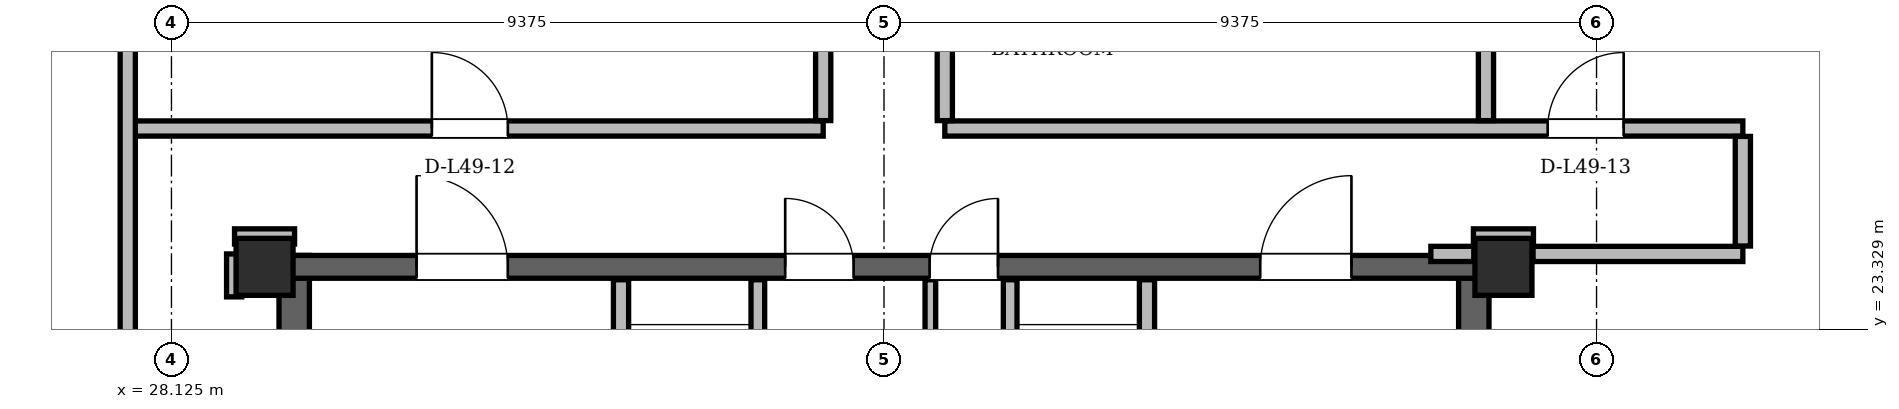
"""IFC4 building model, lengths in metres.
Left out: names, types, materials, properties, quantities, classifications, styles, units other than length and angle.
Written with IfcOpenShell. Run it as: python <this file> out.ifc"""

import sys

from ifc_helpers import new_model, si_unit, direction, frame, frame_2d, origin, origin_2d, place, context, subcontext, project, spatial, rectangle, hollow_rectangle, extrude, element, fill, save


model = new_model("IFC4")
c1 = context("Model", 3, precision=1e-05, world=origin(), true_north=direction((0.0, 1.0)))
c2 = subcontext(c1, "Body", "Model", "MODEL_VIEW")
j1 = project(units=[si_unit("LENGTHUNIT", "METRE"), si_unit("PLANEANGLEUNIT", "RADIAN")], contexts=[c1])
p1 = place(None, origin())
s1 = spatial("IfcSite", under=j1, at=p1, CompositionType="ELEMENT")
p2 = place(p1, origin())
s2 = spatial("IfcBuilding", under=s1, at=p2, CompositionType="ELEMENT")
p3 = place(p2, frame((0.0, 0.0, 185.4)))
s3 = spatial("IfcBuildingStorey", under=s2, at=p3, CompositionType="ELEMENT", Elevation=185.4)
for number, where, z_axis, x_axis in (
    (1, (45.65, 24.15, 0.0), (0.0, 0.0, 1.0), (1.0, 0.0, 0.0)),
    (2, (29.35, 24.15, 0.0), (0.0, 0.0, 1.0), (1.0, 0.0, 0.0)),
):
    element("IfcColumn", number, at=place(p3, frame(where, z_axis=z_axis, x_axis=x_axis)), inside=s3, PredefinedType="COLUMN", context=c2, shape_type="SweptSolid", body=[
        extrude(hollow_rectangle(XDim=0.75, YDim=0.75, WallThickness=0.06, at=origin_2d()), origin(), (0.0, 0.0, 1.0), 3.6),
    ])
for number, where, z_axis, x_axis in (
    (3, (29.74, 11.0, 0.0), (0.0, 0.0, 1.0), (0.0, 1.0, 0.0)),
    (4, (45.26, 11.0, 0.0), (0.0, 0.0, 1.0), (0.0, 1.0, 0.0)),
):
    element("IfcWall", number, at=place(p3, frame(where, z_axis=z_axis, x_axis=x_axis)), inside=s3, PredefinedType="SHEAR", context=c2, shape_type="SweptSolid", body=[
        extrude(rectangle(XDim=13.3, YDim=0.4, at=frame_2d((6.65, 0.0))), origin(), (0.0, 0.0, 1.0), 3.34),
    ])
p4 = place(p3, frame((29.65, 24.15, 0.0), z_axis=(0.0, 0.0, 1.0), x_axis=(1.0, 0.0, 0.0)))
e5 = element("IfcWall", 5, at=p4, inside=s3, PredefinedType="SHEAR", context=c2, shape_type="SweptSolid", body=[
    extrude(rectangle(XDim=15.7, YDim=0.3, at=frame_2d((7.85, 0.0))), origin(), (0.0, 0.0, 1.0), 3.34),
])
p5 = place(p4, frame((1.7, 0.0, 0.0)))
e6 = element("IfcOpeningElement", 6, at=p5, cuts=e5, PredefinedType="OPENING", context=c2, shape_type="SweptSolid", body=[
    extrude(rectangle(XDim=1.2, YDim=2.2, at=frame_2d((0.6, 1.1))), frame((0.0, 0.15, 0.0), z_axis=(0.0, -1.0, 0.0), x_axis=(1.0, 0.0, 0.0)), (0.0, 0.0, 1.0), 0.3),
])
p6 = place(p4, frame((12.8, 0.0, 0.0)))
e7 = element("IfcOpeningElement", 7, at=p6, cuts=e5, PredefinedType="OPENING", context=c2, shape_type="SweptSolid", body=[
    extrude(rectangle(XDim=1.2, YDim=2.2, at=frame_2d((0.6, 1.1))), frame((0.0, 0.15, 0.0), z_axis=(0.0, -1.0, 0.0), x_axis=(1.0, 0.0, 0.0)), (0.0, 0.0, 1.0), 0.3),
])
p7 = place(p4, frame((6.55, 0.0, 0.0)))
e8 = element("IfcOpeningElement", 8, at=p7, cuts=e5, PredefinedType="OPENING", context=c2, shape_type="SweptSolid", body=[
    extrude(rectangle(XDim=0.9, YDim=2.05, at=frame_2d((0.45, 1.025))), frame((0.0, 0.15, 0.0), z_axis=(0.0, -1.0, 0.0), x_axis=(1.0, 0.0, 0.0)), (0.0, 0.0, 1.0), 0.3),
])
p8 = place(p4, frame((8.45, 0.0, 0.0)))
e9 = element("IfcOpeningElement", 9, at=p8, cuts=e5, PredefinedType="OPENING", context=c2, shape_type="SweptSolid", body=[
    extrude(rectangle(XDim=0.9, YDim=2.05, at=frame_2d((0.45, 1.025))), frame((0.0, 0.15, 0.0), z_axis=(0.0, -1.0, 0.0), x_axis=(1.0, 0.0, 0.0)), (0.0, 0.0, 1.0), 0.3),
])
p9 = place(p3, frame((59.519, 11.962, 0.0), z_axis=(0.0, 0.0, 1.0), x_axis=(-0.500007042689, 0.866021337648, 0.0)))
e10 = element("IfcWall", 10, at=p9, inside=s3, PredefinedType="SOLIDWALL", context=c2, shape_type="SweptSolid", body=[
    extrude(rectangle(XDim=36.115, YDim=0.29, at=frame_2d((18.057, 0.0))), origin(), (0.0, 0.0, 1.0), 2.56),
])
p10 = place(p9, frame((8.034, 0.0, 0.0)))
e11 = element("IfcOpeningElement", 11, at=p10, cuts=e10, PredefinedType="OPENING", context=c2, shape_type="SweptSolid", body=[
    extrude(rectangle(XDim=1.5, YDim=2.2, at=frame_2d((0.75, 1.1))), frame((0.0, 0.145, 0.0), z_axis=(0.0, -1.0, 0.0), x_axis=(1.0, 0.0, 0.0)), (0.0, 0.0, 1.0), 0.29),
])
p11 = place(p9, frame((28.035, 0.0, 0.0)))
e12 = element("IfcOpeningElement", 12, at=p11, cuts=e10, PredefinedType="OPENING", context=c2, shape_type="SweptSolid", body=[
    extrude(rectangle(XDim=1.5, YDim=2.2, at=frame_2d((0.75, 1.1))), frame((0.0, 0.145, 0.0), z_axis=(0.0, -1.0, 0.0), x_axis=(1.0, 0.0, 0.0)), (0.0, 0.0, 1.0), 0.29),
])
p12 = place(p9, frame((2.16, 0.0, 0.85)))
e13 = element("IfcOpeningElement", 13, at=p12, cuts=e10, PredefinedType="OPENING", context=c2, shape_type="SweptSolid", body=[
    extrude(rectangle(XDim=1.4, YDim=1.6, at=frame_2d((0.7, 0.8))), frame((0.0, 0.145, 0.0), z_axis=(0.0, -1.0, 0.0), x_axis=(1.0, 0.0, 0.0)), (0.0, 0.0, 1.0), 0.29),
])
p13 = place(p9, frame((14.363, 0.0, 0.85)))
e14 = element("IfcOpeningElement", 14, at=p13, cuts=e10, PredefinedType="OPENING", context=c2, shape_type="SweptSolid", body=[
    extrude(rectangle(XDim=1.2, YDim=1.48, at=frame_2d((0.6, 0.74))), frame((0.0, 0.145, 0.0), z_axis=(0.0, -1.0, 0.0), x_axis=(1.0, 0.0, 0.0)), (0.0, 0.0, 1.0), 0.29),
])
p14 = place(p9, frame((21.574, 0.0, 0.85)))
e15 = element("IfcOpeningElement", 15, at=p14, cuts=e10, PredefinedType="OPENING", context=c2, shape_type="SweptSolid", body=[
    extrude(rectangle(XDim=2.8, YDim=1.6, at=frame_2d((1.4, 0.8))), frame((0.0, 0.145, 0.0), z_axis=(0.0, -1.0, 0.0), x_axis=(1.0, 0.0, 0.0)), (0.0, 0.0, 1.0), 0.29),
])
p15 = place(p9, frame((32.304, 0.0, 0.85)))
e16 = element("IfcOpeningElement", 16, at=p15, cuts=e10, PredefinedType="OPENING", context=c2, shape_type="SweptSolid", body=[
    extrude(rectangle(XDim=1.6, YDim=1.6, at=frame_2d((0.8, 0.8))), frame((0.0, 0.145, 0.0), z_axis=(0.0, -1.0, 0.0), x_axis=(1.0, 0.0, 0.0)), (0.0, 0.0, 1.0), 0.29),
])
p16 = place(p3, frame((33.539, 43.238, 0.0), z_axis=(0.0, 0.0, 1.0), x_axis=(-0.500007042689, -0.866021337648, 0.0)))
e17 = element("IfcWall", 17, at=p16, inside=s3, PredefinedType="SOLIDWALL", context=c2, shape_type="SweptSolid", body=[
    extrude(rectangle(XDim=36.115, YDim=0.29, at=frame_2d((18.057, 0.0))), origin(), (0.0, 0.0, 1.0), 2.56),
])
p17 = place(p16, frame((8.034, 0.0, 0.0)))
e18 = element("IfcOpeningElement", 18, at=p17, cuts=e17, PredefinedType="OPENING", context=c2, shape_type="SweptSolid", body=[
    extrude(rectangle(XDim=1.5, YDim=2.2, at=frame_2d((0.75, 1.1))), frame((0.0, 0.145, 0.0), z_axis=(0.0, -1.0, 0.0), x_axis=(1.0, 0.0, 0.0)), (0.0, 0.0, 1.0), 0.29),
])
p18 = place(p16, frame((28.035, 0.0, 0.0)))
e19 = element("IfcOpeningElement", 19, at=p18, cuts=e17, PredefinedType="OPENING", context=c2, shape_type="SweptSolid", body=[
    extrude(rectangle(XDim=1.5, YDim=2.2, at=frame_2d((0.75, 1.1))), frame((0.0, 0.145, 0.0), z_axis=(0.0, -1.0, 0.0), x_axis=(1.0, 0.0, 0.0)), (0.0, 0.0, 1.0), 0.29),
])
p19 = place(p16, frame((33.831, 0.0, 0.85)))
e20 = element("IfcOpeningElement", 20, at=p19, cuts=e17, PredefinedType="OPENING", context=c2, shape_type="SweptSolid", body=[
    extrude(rectangle(XDim=1.2, YDim=1.48, at=frame_2d((0.6, 0.74))), frame((0.0, 0.145, 0.0), z_axis=(0.0, -1.0, 0.0), x_axis=(1.0, 0.0, 0.0)), (0.0, 0.0, 1.0), 0.29),
])
p20 = place(p16, frame((18.648, 0.0, 0.85)))
e21 = element("IfcOpeningElement", 21, at=p20, cuts=e17, PredefinedType="OPENING", context=c2, shape_type="SweptSolid", body=[
    extrude(rectangle(XDim=2.0, YDim=1.6, at=frame_2d((1.0, 0.8))), frame((0.0, 0.145, 0.0), z_axis=(0.0, -1.0, 0.0), x_axis=(1.0, 0.0, 0.0)), (0.0, 0.0, 1.0), 0.29),
])
p21 = place(p16, frame((26.235, 0.0, 0.85)))
e22 = element("IfcOpeningElement", 22, at=p21, cuts=e17, PredefinedType="OPENING", context=c2, shape_type="SweptSolid", body=[
    extrude(rectangle(XDim=1.2, YDim=1.48, at=frame_2d((0.6, 0.74))), frame((0.0, 0.145, 0.0), z_axis=(0.0, -1.0, 0.0), x_axis=(1.0, 0.0, 0.0)), (0.0, 0.0, 1.0), 0.29),
])
p22 = place(p16, frame((15.622, 0.0, 0.85)))
e23 = element("IfcOpeningElement", 23, at=p22, cuts=e17, PredefinedType="OPENING", context=c2, shape_type="SweptSolid", body=[
    extrude(rectangle(XDim=1.2, YDim=1.48, at=frame_2d((0.6, 0.74))), frame((0.0, 0.145, 0.0), z_axis=(0.0, -1.0, 0.0), x_axis=(1.0, 0.0, 0.0)), (0.0, 0.0, 1.0), 0.29),
])
p23 = place(p16, frame((6.537, 0.0, 0.85)))
e24 = element("IfcOpeningElement", 24, at=p23, cuts=e17, PredefinedType="OPENING", context=c2, shape_type="SweptSolid", body=[
    extrude(rectangle(XDim=1.2, YDim=1.48, at=frame_2d((0.6, 0.74))), frame((0.0, 0.145, 0.0), z_axis=(0.0, -1.0, 0.0), x_axis=(1.0, 0.0, 0.0)), (0.0, 0.0, 1.0), 0.29),
])
p24 = place(p16, frame((13.204, 0.0, 0.85)))
e25 = element("IfcOpeningElement", 25, at=p24, cuts=e17, PredefinedType="OPENING", context=c2, shape_type="SweptSolid", body=[
    extrude(rectangle(XDim=1.6, YDim=1.6, at=frame_2d((0.8, 0.8))), frame((0.0, 0.145, 0.0), z_axis=(0.0, -1.0, 0.0), x_axis=(1.0, 0.0, 0.0)), (0.0, 0.0, 1.0), 0.29),
])
p25 = place(p16, frame((1.107, 0.0, 0.85)))
e26 = element("IfcOpeningElement", 26, at=p25, cuts=e17, PredefinedType="OPENING", context=c2, shape_type="SweptSolid", body=[
    extrude(rectangle(XDim=2.0, YDim=1.6, at=frame_2d((1.0, 0.8))), frame((0.0, 0.145, 0.0), z_axis=(0.0, -1.0, 0.0), x_axis=(1.0, 0.0, 0.0)), (0.0, 0.0, 1.0), 0.29),
])
p26 = place(p3, frame((34.04, 19.48, 0.0), z_axis=(0.0, 0.0, 1.0), x_axis=(0.0, 1.0, 0.0)))
e27 = element("IfcWall", 27, at=p26, inside=s3, PredefinedType="PARTITIONING", context=c2, shape_type="SweptSolid", body=[
    extrude(rectangle(XDim=4.5, YDim=0.2, at=frame_2d((2.25, 0.0))), origin(), (0.0, 0.0, 1.0), 3.34),
])
p27 = place(p26, frame((2.12, 0.0, 0.0)))
e28 = element("IfcOpeningElement", 28, at=p27, cuts=e27, PredefinedType="OPENING", context=c2, shape_type="SweptSolid", body=[
    extrude(rectangle(XDim=1.1, YDim=2.2, at=frame_2d((0.55, 1.1))), frame((0.0, 0.1, 0.0), z_axis=(0.0, -1.0, 0.0), x_axis=(1.0, 0.0, 0.0)), (0.0, 0.0, 1.0), 0.2),
])
p28 = place(p3, frame((35.84, 20.96, 0.0), z_axis=(0.0, 0.0, 1.0), x_axis=(0.0, 1.0, 0.0)))
e29 = element("IfcWall", 29, at=p28, inside=s3, PredefinedType="PARTITIONING", context=c2, shape_type="SweptSolid", body=[
    extrude(rectangle(XDim=3.02, YDim=0.18, at=frame_2d((1.51, 0.0))), origin(), (0.0, 0.0, 1.0), 3.34),
])
p29 = place(p3, frame((40.96, 19.48, 0.0), z_axis=(0.0, 0.0, 1.0), x_axis=(0.0, 1.0, 0.0)))
e30 = element("IfcWall", 30, at=p29, inside=s3, PredefinedType="PARTITIONING", context=c2, shape_type="SweptSolid", body=[
    extrude(rectangle(XDim=4.5, YDim=0.2, at=frame_2d((2.25, 0.0))), origin(), (0.0, 0.0, 1.0), 3.34),
])
p30 = place(p29, frame((2.12, 0.0, 0.0)))
e31 = element("IfcOpeningElement", 31, at=p30, cuts=e30, PredefinedType="OPENING", context=c2, shape_type="SweptSolid", body=[
    extrude(rectangle(XDim=1.1, YDim=2.2, at=frame_2d((0.55, 1.1))), frame((0.0, 0.1, 0.0), z_axis=(0.0, -1.0, 0.0), x_axis=(1.0, 0.0, 0.0)), (0.0, 0.0, 1.0), 0.2),
])
p31 = place(p3, frame((39.16, 20.96, 0.0), z_axis=(0.0, 0.0, 1.0), x_axis=(0.0, 1.0, 0.0)))
e32 = element("IfcWall", 32, at=p31, inside=s3, PredefinedType="PARTITIONING", context=c2, shape_type="SweptSolid", body=[
    extrude(rectangle(XDim=3.02, YDim=0.18, at=frame_2d((1.51, 0.0))), origin(), (0.0, 0.0, 1.0), 3.34),
])
p32 = place(p3, frame((38.11, 21.06, 0.0), z_axis=(0.0, 0.0, 1.0), x_axis=(0.0, 1.0, 0.0)))
e33 = element("IfcWall", 33, at=p32, inside=s3, PredefinedType="PARTITIONING", context=c2, shape_type="SweptSolid", body=[
    extrude(rectangle(XDim=2.92, YDim=0.14, at=frame_2d((1.46, 0.0))), origin(), (0.0, 0.0, 1.0), 3.34),
])
p33 = place(p3, frame((44.695, 24.32, 0.0), z_axis=(0.0, 0.0, 1.0), x_axis=(1.0, 0.0, 0.0)))
e34 = element("IfcWall", 34, at=p33, inside=s3, PredefinedType="PARTITIONING", context=c2, shape_type="SweptSolid", body=[
    extrude(rectangle(XDim=0.565, YDim=0.2, at=frame_2d((0.282, 0.0))), origin(), (0.0, 0.0, 1.0), 2.48),
])
p34 = place(p3, frame((46.04, 24.32, 0.0), z_axis=(0.0, 0.0, 1.0), x_axis=(1.0, 0.0, 0.0)))
e35 = element("IfcWall", 35, at=p34, inside=s3, PredefinedType="PARTITIONING", context=c2, shape_type="SweptSolid", body=[
    extrude(rectangle(XDim=2.76, YDim=0.2, at=frame_2d((1.38, 0.0))), origin(), (0.0, 0.0, 1.0), 3.34),
])
for number, where, z_axis, x_axis in (
    (36, (28.955, 24.55, 0.0), (0.0, 0.0, 1.0), (1.0, 0.0, 0.0)),
    (37, (45.255, 24.55, 0.0), (0.0, 0.0, 1.0), (1.0, 0.0, 0.0)),
):
    element("IfcWall", number, at=place(p3, frame(where, z_axis=z_axis, x_axis=x_axis)), inside=s3, PredefinedType="PARTITIONING", context=c2, shape_type="SweptSolid", body=[
        extrude(rectangle(XDim=0.79, YDim=0.2, at=frame_2d((0.395, 0.0))), origin(), (0.0, 0.0, 1.0), 2.802),
    ])
p35 = place(p3, frame((27.55, 25.97, 0.0), z_axis=(0.0, 0.0, 1.0), x_axis=(1.0, 0.0, 0.0)))
e38 = element("IfcWall", 38, at=p35, inside=s3, PredefinedType="PARTITIONING", context=c2, shape_type="SweptSolid", body=[
    extrude(rectangle(XDim=9.15, YDim=0.2, at=frame_2d((4.575, 0.0))), origin(), (0.0, 0.0, 1.0), 2.802),
])
p36 = place(p35, frame((4.001, 0.0, 0.0)))
e39 = element("IfcOpeningElement", 39, at=p36, cuts=e38, PredefinedType="OPENING", context=c2, shape_type="SweptSolid", body=[
    extrude(rectangle(XDim=1.0, YDim=2.18, at=frame_2d((0.5, 1.09))), frame((0.0, 0.1, 0.0), z_axis=(0.0, -1.0, 0.0), x_axis=(1.0, 0.0, 0.0)), (0.0, 0.0, 1.0), 0.2),
])
p37 = place(p3, frame((38.3, 25.97, 0.0), z_axis=(0.0, 0.0, 1.0), x_axis=(1.0, 0.0, 0.0)))
e40 = element("IfcWall", 40, at=p37, inside=s3, PredefinedType="PARTITIONING", context=c2, shape_type="SweptSolid", body=[
    extrude(rectangle(XDim=10.5, YDim=0.2, at=frame_2d((5.25, 0.0))), origin(), (0.0, 0.0, 1.0), 2.802),
])
p38 = place(p37, frame((7.932, 0.0, 0.0)))
e41 = element("IfcOpeningElement", 41, at=p38, cuts=e40, PredefinedType="OPENING", context=c2, shape_type="SweptSolid", body=[
    extrude(rectangle(XDim=1.0, YDim=2.18, at=frame_2d((0.5, 1.09))), frame((0.0, 0.1, 0.0), z_axis=(0.0, -1.0, 0.0), x_axis=(1.0, 0.0, 0.0)), (0.0, 0.0, 1.0), 0.2),
])
p39 = place(p3, frame((27.55, 18.554, 0.0), z_axis=(0.0, 0.0, 1.0), x_axis=(0.0, 1.0, 0.0)))
e42 = element("IfcWall", 42, at=p39, inside=s3, PredefinedType="PARTITIONING", context=c2, shape_type="SweptSolid", body=[
    extrude(rectangle(XDim=14.013, YDim=0.2, at=frame_2d((7.007, 0.0))), origin(), (0.0, 0.0, 1.0), 2.56),
])
p40 = place(p39, frame((2.257, 0.0, 0.0)))
e43 = element("IfcOpeningElement", 43, at=p40, cuts=e42, PredefinedType="OPENING", context=c2, shape_type="SweptSolid", body=[
    extrude(rectangle(XDim=1.0, YDim=2.18, at=frame_2d((0.5, 1.09))), frame((0.0, 0.1, 0.0), z_axis=(0.0, -1.0, 0.0), x_axis=(1.0, 0.0, 0.0)), (0.0, 0.0, 1.0), 0.2),
])
p41 = place(p3, frame((28.95, 23.755, 0.0), z_axis=(0.0, 0.0, 1.0), x_axis=(0.0, 1.0, 0.0)))
e44 = element("IfcWall", 44, at=p41, inside=s3, PredefinedType="PARTITIONING", context=c2, shape_type="SweptSolid", body=[
    extrude(rectangle(XDim=0.565, YDim=0.2, at=frame_2d((0.283, 0.0))), origin(), (0.0, 0.0, 1.0), 3.34),
])
p42 = place(p3, frame((36.7, 26.074, 0.0), z_axis=(0.0, 0.0, 1.0), x_axis=(0.0, 1.0, 0.0)))
e45 = element("IfcWall", 45, at=p42, inside=s3, PredefinedType="PARTITIONING", context=c2, shape_type="SweptSolid", body=[
    extrude(rectangle(XDim=17.015, YDim=0.2, at=frame_2d((8.507, 0.0))), origin(), (0.0, 0.0, 1.0), 3.34),
])
p43 = place(p3, frame((38.3, 26.074, 0.0), z_axis=(0.0, 0.0, 1.0), x_axis=(0.0, 1.0, 0.0)))
e46 = element("IfcWall", 46, at=p43, inside=s3, PredefinedType="PARTITIONING", context=c2, shape_type="SweptSolid", body=[
    extrude(rectangle(XDim=6.022, YDim=0.2, at=frame_2d((3.011, 0.0))), origin(), (0.0, 0.0, 1.0), 3.34),
])
p44 = place(p43, frame((3.656, 0.0, 0.0)))
e47 = element("IfcOpeningElement", 47, at=p44, cuts=e46, PredefinedType="OPENING", context=c2, shape_type="SweptSolid", body=[
    extrude(rectangle(XDim=1.0, YDim=2.18, at=frame_2d((0.5, 1.09))), frame((0.0, 0.1, 0.0), z_axis=(0.0, -1.0, 0.0), x_axis=(1.0, 0.0, 0.0)), (0.0, 0.0, 1.0), 0.2),
])
p45 = place(p3, frame((45.42, 26.074, 0.0), z_axis=(0.0, 0.0, 1.0), x_axis=(0.0, 1.0, 0.0)))
e48 = element("IfcWall", 48, at=p45, inside=s3, PredefinedType="PARTITIONING", context=c2, shape_type="SweptSolid", body=[
    extrude(rectangle(XDim=10.009, YDim=0.2, at=frame_2d((5.005, 0.0))), origin(), (0.0, 0.0, 1.0), 2.56),
])
p46 = place(p3, frame((48.8, 24.424, 0.0), z_axis=(0.0, 0.0, 1.0), x_axis=(0.0, 1.0, 0.0)))
e49 = element("IfcWall", 49, at=p46, inside=s3, PredefinedType="PARTITIONING", context=c2, shape_type="SweptSolid", body=[
    extrude(rectangle(XDim=1.442, YDim=0.2, at=frame_2d((0.721, 0.0))), origin(), (0.0, 0.0, 1.0), 3.34),
])
p47 = place(p5, origin())
e50 = element("IfcDoor", 50, at=p47, inside=s3, OperationType="SINGLE_SWING_LEFT", PredefinedType="DOOR", context=c2, shape_type="SweptSolid", body=[
    extrude(rectangle(XDim=1.2, YDim=2.2, at=frame_2d((0.6, 1.1))), frame((0.0, 0.025, 0.0), z_axis=(0.0, -1.0, 0.0), x_axis=(1.0, 0.0, 0.0)), (0.0, 0.0, 1.0), 0.05),
])
fill(e6, e50)
p48 = place(p6, origin())
e51 = element("IfcDoor", 51, at=p48, inside=s3, OperationType="SINGLE_SWING_RIGHT", PredefinedType="DOOR", context=c2, shape_type="SweptSolid", body=[
    extrude(rectangle(XDim=1.2, YDim=2.2, at=frame_2d((0.6, 1.1))), frame((0.0, 0.025, 0.0), z_axis=(0.0, -1.0, 0.0), x_axis=(1.0, 0.0, 0.0)), (0.0, 0.0, 1.0), 0.05),
])
fill(e7, e51)
p49 = place(p7, origin())
e52 = element("IfcDoor", 52, at=p49, inside=s3, OperationType="SINGLE_SWING_LEFT", PredefinedType="DOOR", context=c2, shape_type="SweptSolid", body=[
    extrude(rectangle(XDim=0.9, YDim=2.05, at=frame_2d((0.45, 1.025))), frame((0.0, 0.025, 0.0), z_axis=(0.0, -1.0, 0.0), x_axis=(1.0, 0.0, 0.0)), (0.0, 0.0, 1.0), 0.05),
])
fill(e8, e52)
p50 = place(p8, origin())
e53 = element("IfcDoor", 53, at=p50, inside=s3, OperationType="SINGLE_SWING_RIGHT", PredefinedType="DOOR", context=c2, shape_type="SweptSolid", body=[
    extrude(rectangle(XDim=0.9, YDim=2.05, at=frame_2d((0.45, 1.025))), frame((0.0, 0.025, 0.0), z_axis=(0.0, -1.0, 0.0), x_axis=(1.0, 0.0, 0.0)), (0.0, 0.0, 1.0), 0.05),
])
fill(e9, e53)
p51 = place(p36, origin())
e54 = element("IfcDoor", 54, at=p51, inside=s3, OperationType="SINGLE_SWING_LEFT", PredefinedType="DOOR", context=c2, shape_type="SweptSolid", body=[
    extrude(rectangle(XDim=1.0, YDim=2.18, at=frame_2d((0.5, 1.09))), frame((0.0, 0.025, 0.0), z_axis=(0.0, -1.0, 0.0), x_axis=(1.0, 0.0, 0.0)), (0.0, 0.0, 1.0), 0.05),
])
fill(e39, e54)
p52 = place(p38, origin())
e55 = element("IfcDoor", 55, at=p52, inside=s3, OperationType="SINGLE_SWING_RIGHT", PredefinedType="DOOR", context=c2, shape_type="SweptSolid", body=[
    extrude(rectangle(XDim=1.0, YDim=2.18, at=frame_2d((0.5, 1.09))), frame((0.0, 0.025, 0.0), z_axis=(0.0, -1.0, 0.0), x_axis=(1.0, 0.0, 0.0)), (0.0, 0.0, 1.0), 0.05),
])
fill(e41, e55)
save(model, sys.argv[1])
